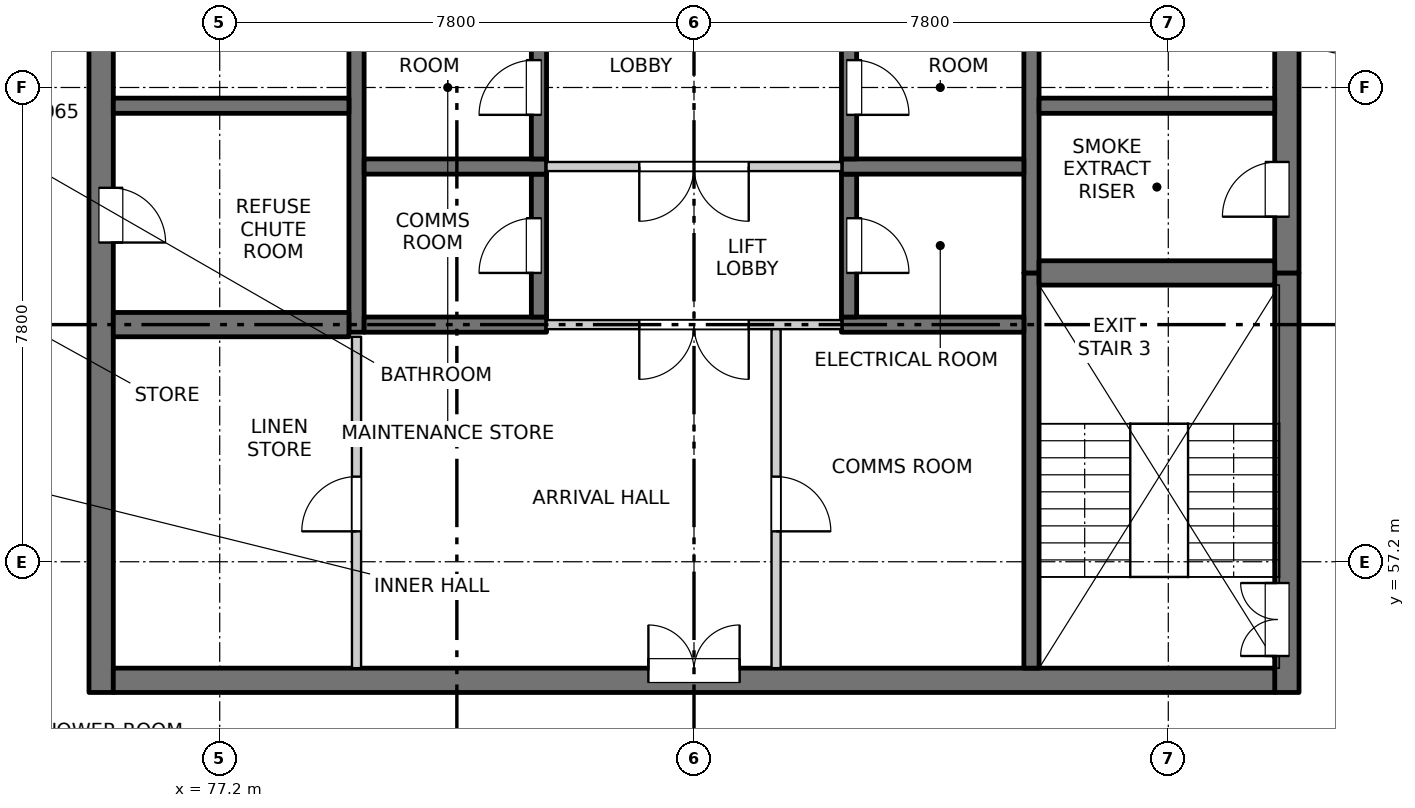
"""IFC4 building model, lengths in metres.
Left out: names, types, materials, properties, quantities, classifications, styles, units other than length and angle.
Written with IfcOpenShell. Run it as: python <this file> out.ifc"""

import sys

from ifc_helpers import new_model, si_unit, direction, frame, frame_2d, origin, place, context, subcontext, project, spatial, rectangle, extrude, element, fill, save


model = new_model("IFC4")
c1 = context("Model", 3, precision=1e-05, world=origin(), true_north=direction((0.0, 1.0)))
c2 = subcontext(c1, "Body", "Model", "MODEL_VIEW")
j1 = project(units=[si_unit("LENGTHUNIT", "METRE"), si_unit("PLANEANGLEUNIT", "RADIAN")], contexts=[c1])
p1 = place(None, origin())
s1 = spatial("IfcSite", under=j1, at=p1, CompositionType="ELEMENT")
p2 = place(p1, origin())
s2 = spatial("IfcBuilding", under=s1, at=p2, CompositionType="ELEMENT")
p3 = place(p2, frame((0.0, 0.0, 238.1)))
s3 = spatial("IfcBuildingStorey", under=s2, at=p3, CompositionType="ELEMENT", Elevation=238.1)
p4 = place(p3, frame((75.25, 55.05, -0.25), z_axis=(0.0, 0.0, 1.0), x_axis=(0.0, 1.0, 0.0)))
e1 = element("IfcWall", 1, at=p4, inside=s3, PredefinedType="SOLIDWALL", context=c2, shape_type="SweptSolid", body=[
    extrude(rectangle(XDim=22.25, YDim=0.4, at=frame_2d((11.125, 0.0))), origin(), (0.0, 0.0, 1.0), 3.35),
])
p5 = place(p4, frame((7.4, 0.0, 0.25)))
e2 = element("IfcOpeningElement", 2, at=p5, cuts=e1, PredefinedType="OPENING", context=c2, shape_type="SweptSolid", body=[
    extrude(rectangle(XDim=0.9, YDim=2.1, at=frame_2d((0.45, 1.05))), frame((0.0, 0.21, 0.0), z_axis=(0.0, -1.0, 0.0), x_axis=(1.0, 0.0, 0.0)), (0.0, 0.0, 1.0), 0.42),
])
p6 = place(p4, frame((12.05, 0.0, 0.25)))
e3 = element("IfcOpeningElement", 3, at=p6, cuts=e1, PredefinedType="OPENING", context=c2, shape_type="SweptSolid", body=[
    extrude(rectangle(XDim=0.9, YDim=2.1, at=frame_2d((0.45, 1.05))), frame((0.0, 0.21, 0.0), z_axis=(0.0, -1.0, 0.0), x_axis=(1.0, 0.0, 0.0)), (0.0, 0.0, 1.0), 0.42),
])
p7 = place(p4, frame((16.55, 0.0, 0.25)))
e4 = element("IfcOpeningElement", 4, at=p7, cuts=e1, PredefinedType="OPENING", context=c2, shape_type="SweptSolid", body=[
    extrude(rectangle(XDim=0.9, YDim=2.1, at=frame_2d((0.45, 1.05))), frame((0.0, 0.21, 0.0), z_axis=(0.0, -1.0, 0.0), x_axis=(1.0, 0.0, 0.0)), (0.0, 0.0, 1.0), 0.42),
])
p8 = place(p4, frame((20.0, 0.0, 0.25)))
e5 = element("IfcOpeningElement", 5, at=p8, cuts=e1, PredefinedType="OPENING", context=c2, shape_type="SweptSolid", body=[
    extrude(rectangle(XDim=0.9, YDim=2.1, at=frame_2d((0.45, 1.05))), frame((0.0, 0.21, 0.0), z_axis=(0.0, -1.0, 0.0), x_axis=(1.0, 0.0, 0.0)), (0.0, 0.0, 1.0), 0.42),
])
p9 = place(p3, frame((94.75, 55.05, -0.25), z_axis=(0.0, 0.0, 1.0), x_axis=(0.0, 1.0, 0.0)))
e6 = element("IfcWall", 6, at=p9, inside=s3, PredefinedType="SOLIDWALL", context=c2, shape_type="SweptSolid", body=[
    extrude(rectangle(XDim=6.9, YDim=0.4, at=frame_2d((3.45, 0.0))), origin(), (0.0, 0.0, 1.0), 3.35),
])
p10 = place(p9, frame((0.6, 0.0, 0.25)))
e7 = element("IfcOpeningElement", 7, at=p10, cuts=e6, PredefinedType="OPENING", context=c2, shape_type="SweptSolid", body=[
    extrude(rectangle(XDim=1.2, YDim=2.1, at=frame_2d((0.6, 1.05))), frame((0.0, 0.21, 0.0), z_axis=(0.0, -1.0, 0.0), x_axis=(1.0, 0.0, 0.0)), (0.0, 0.0, 1.0), 0.42),
])
p11 = place(p3, frame((94.75, 61.95, -0.25), z_axis=(0.0, 0.0, 1.0), x_axis=(0.0, 1.0, 0.0)))
e8 = element("IfcWall", 8, at=p11, inside=s3, PredefinedType="SOLIDWALL", context=c2, shape_type="SweptSolid", body=[
    extrude(rectangle(XDim=15.35, YDim=0.4, at=frame_2d((7.675, 0.0))), origin(), (0.0, 0.0, 1.0), 3.35),
])
p12 = place(p11, frame((0.925, 0.0, 0.25)))
e9 = element("IfcOpeningElement", 9, at=p12, cuts=e8, PredefinedType="OPENING", context=c2, shape_type="SweptSolid", body=[
    extrude(rectangle(XDim=0.9, YDim=2.1, at=frame_2d((0.45, 1.05))), frame((0.0, 0.21, 0.0), z_axis=(0.0, -1.0, 0.0), x_axis=(1.0, 0.0, 0.0)), (0.0, 0.0, 1.0), 0.42),
])
p13 = place(p11, frame((6.8, 0.0, 0.25)))
e10 = element("IfcOpeningElement", 10, at=p13, cuts=e8, PredefinedType="OPENING", context=c2, shape_type="SweptSolid", body=[
    extrude(rectangle(XDim=0.9, YDim=2.1, at=frame_2d((0.45, 1.05))), frame((0.0, 0.21, 0.0), z_axis=(0.0, -1.0, 0.0), x_axis=(1.0, 0.0, 0.0)), (0.0, 0.0, 1.0), 0.42),
])
p14 = place(p11, frame((13.1, 0.0, 0.25)))
e11 = element("IfcOpeningElement", 11, at=p14, cuts=e8, PredefinedType="OPENING", context=c2, shape_type="SweptSolid", body=[
    extrude(rectangle(XDim=0.9, YDim=2.1, at=frame_2d((0.45, 1.05))), frame((0.0, 0.21, 0.0), z_axis=(0.0, -1.0, 0.0), x_axis=(1.0, 0.0, 0.0)), (0.0, 0.0, 1.0), 0.42),
])
p15 = place(p3, frame((75.45, 55.25, -0.25), z_axis=(0.0, 0.0, 1.0), x_axis=(1.0, 0.0, 0.0)))
e12 = element("IfcWall", 12, at=p15, inside=s3, PredefinedType="SOLIDWALL", context=c2, shape_type="SweptSolid", body=[
    extrude(rectangle(XDim=19.1, YDim=0.4, at=frame_2d((9.55, 0.0))), origin(), (0.0, 0.0, 1.0), 3.35),
])
p16 = place(p15, frame((8.8, 0.0, 0.25)))
e13 = element("IfcOpeningElement", 13, at=p16, cuts=e12, PredefinedType="OPENING", context=c2, shape_type="SweptSolid", body=[
    extrude(rectangle(XDim=1.5, YDim=2.1, at=frame_2d((0.75, 1.05))), frame((0.0, 0.21, 0.0), z_axis=(0.0, -1.0, 0.0), x_axis=(1.0, 0.0, 0.0)), (0.0, 0.0, 1.0), 0.42),
])
p17 = place(p3, frame((79.45, 60.975, -0.25), z_axis=(0.0, 0.0, 1.0), x_axis=(0.0, 1.0, 0.0)))
e14 = element("IfcWall", 14, at=p17, inside=s3, PredefinedType="SOLIDWALL", context=c2, shape_type="SweptSolid", body=[
    extrude(rectangle(XDim=16.325, YDim=0.25, at=frame_2d((8.163, 0.0))), origin(), (0.0, 0.0, 1.0), 3.35),
])
p18 = place(p3, frame((90.55, 55.45, -0.25), z_axis=(0.0, 0.0, 1.0), x_axis=(0.0, 1.0, 0.0)))
e15 = element("IfcWall", 15, at=p18, inside=s3, PredefinedType="SOLIDWALL", context=c2, shape_type="SweptSolid", body=[
    extrude(rectangle(XDim=6.5, YDim=0.25, at=frame_2d((3.25, 0.0))), origin(), (0.0, 0.0, 1.0), 3.35),
])
p19 = place(p3, frame((90.55, 61.95, -0.25), z_axis=(0.0, 0.0, 1.0), x_axis=(0.0, 1.0, 0.0)))
e16 = element("IfcWall", 16, at=p19, inside=s3, PredefinedType="SOLIDWALL", context=c2, shape_type="SweptSolid", body=[
    extrude(rectangle(XDim=15.35, YDim=0.25, at=frame_2d((7.675, 0.0))), origin(), (0.0, 0.0, 1.0), 3.35),
])
p20 = place(p3, frame((79.575, 61.1, -0.25), z_axis=(0.0, 0.0, 1.0), x_axis=(1.0, 0.0, 0.0)))
e17 = element("IfcWall", 17, at=p20, inside=s3, PredefinedType="SOLIDWALL", context=c2, shape_type="SweptSolid", body=[
    extrude(rectangle(XDim=3.0, YDim=0.25, at=frame_2d((1.5, 0.0))), origin(), (0.0, 0.0, 1.0), 3.35),
])
p21 = place(p3, frame((82.45, 61.225, -0.25), z_axis=(0.0, 0.0, 1.0), x_axis=(0.0, 1.0, 0.0)))
e18 = element("IfcWall", 18, at=p21, inside=s3, PredefinedType="SOLIDWALL", context=c2, shape_type="SweptSolid", body=[
    extrude(rectangle(XDim=2.35, YDim=0.25, at=frame_2d((1.175, 0.0))), origin(), (0.0, 0.0, 1.0), 3.35),
])
p22 = place(p21, frame((0.725, 0.0, 0.25)))
e19 = element("IfcOpeningElement", 19, at=p22, cuts=e18, PredefinedType="OPENING", context=c2, shape_type="SweptSolid", body=[
    extrude(rectangle(XDim=0.9, YDim=2.1, at=frame_2d((0.45, 1.05))), frame((0.0, 0.135, 0.0), z_axis=(0.0, -1.0, 0.0), x_axis=(1.0, 0.0, 0.0)), (0.0, 0.0, 1.0), 0.27),
])
p23 = place(p3, frame((79.575, 63.7, -0.25), z_axis=(0.0, 0.0, 1.0), x_axis=(1.0, 0.0, 0.0)))
e20 = element("IfcWall", 20, at=p23, inside=s3, PredefinedType="SOLIDWALL", context=c2, shape_type="SweptSolid", body=[
    extrude(rectangle(XDim=3.0, YDim=0.25, at=frame_2d((1.5, 0.0))), origin(), (0.0, 0.0, 1.0), 3.35),
])
p24 = place(p3, frame((82.45, 63.825, -0.25), z_axis=(0.0, 0.0, 1.0), x_axis=(0.0, 1.0, 0.0)))
e21 = element("IfcWall", 21, at=p24, inside=s3, PredefinedType="SOLIDWALL", context=c2, shape_type="SweptSolid", body=[
    extrude(rectangle(XDim=2.35, YDim=0.25, at=frame_2d((1.175, 0.0))), origin(), (0.0, 0.0, 1.0), 3.35),
])
p25 = place(p24, frame((0.725, 0.0, 0.25)))
e22 = element("IfcOpeningElement", 22, at=p25, cuts=e21, PredefinedType="OPENING", context=c2, shape_type="SweptSolid", body=[
    extrude(rectangle(XDim=0.9, YDim=2.1, at=frame_2d((0.45, 1.05))), frame((0.0, 0.135, 0.0), z_axis=(0.0, -1.0, 0.0), x_axis=(1.0, 0.0, 0.0)), (0.0, 0.0, 1.0), 0.27),
])
p26 = place(p3, frame((87.425, 61.1, -0.25), z_axis=(0.0, 0.0, 1.0), x_axis=(1.0, 0.0, 0.0)))
e23 = element("IfcWall", 23, at=p26, inside=s3, PredefinedType="SOLIDWALL", context=c2, shape_type="SweptSolid", body=[
    extrude(rectangle(XDim=3.0, YDim=0.25, at=frame_2d((1.5, 0.0))), origin(), (0.0, 0.0, 1.0), 3.35),
])
p27 = place(p3, frame((87.55, 61.225, -0.25), z_axis=(0.0, 0.0, 1.0), x_axis=(0.0, 1.0, 0.0)))
e24 = element("IfcWall", 24, at=p27, inside=s3, PredefinedType="SOLIDWALL", context=c2, shape_type="SweptSolid", body=[
    extrude(rectangle(XDim=2.35, YDim=0.25, at=frame_2d((1.175, 0.0))), origin(), (0.0, 0.0, 1.0), 3.35),
])
p28 = place(p27, frame((0.725, 0.0, 0.25)))
e25 = element("IfcOpeningElement", 25, at=p28, cuts=e24, PredefinedType="OPENING", context=c2, shape_type="SweptSolid", body=[
    extrude(rectangle(XDim=0.9, YDim=2.1, at=frame_2d((0.45, 1.05))), frame((0.0, 0.135, 0.0), z_axis=(0.0, -1.0, 0.0), x_axis=(1.0, 0.0, 0.0)), (0.0, 0.0, 1.0), 0.27),
])
p29 = place(p3, frame((87.425, 63.7, -0.25), z_axis=(0.0, 0.0, 1.0), x_axis=(1.0, 0.0, 0.0)))
e26 = element("IfcWall", 26, at=p29, inside=s3, PredefinedType="SOLIDWALL", context=c2, shape_type="SweptSolid", body=[
    extrude(rectangle(XDim=3.0, YDim=0.25, at=frame_2d((1.5, 0.0))), origin(), (0.0, 0.0, 1.0), 3.35),
])
p30 = place(p3, frame((87.55, 63.825, -0.25), z_axis=(0.0, 0.0, 1.0), x_axis=(0.0, 1.0, 0.0)))
e27 = element("IfcWall", 27, at=p30, inside=s3, PredefinedType="SOLIDWALL", context=c2, shape_type="SweptSolid", body=[
    extrude(rectangle(XDim=2.35, YDim=0.25, at=frame_2d((1.175, 0.0))), origin(), (0.0, 0.0, 1.0), 3.35),
])
p31 = place(p30, frame((0.725, 0.0, 0.25)))
e28 = element("IfcOpeningElement", 28, at=p31, cuts=e27, PredefinedType="OPENING", context=c2, shape_type="SweptSolid", body=[
    extrude(rectangle(XDim=0.9, YDim=2.1, at=frame_2d((0.45, 1.05))), frame((0.0, 0.135, 0.0), z_axis=(0.0, -1.0, 0.0), x_axis=(1.0, 0.0, 0.0)), (0.0, 0.0, 1.0), 0.27),
])
p32 = place(p3, frame((75.45, 61.1, -0.25), z_axis=(0.0, 0.0, 1.0), x_axis=(1.0, 0.0, 0.0)))
e29 = element("IfcWall", 29, at=p32, inside=s3, PredefinedType="SOLIDWALL", context=c2, shape_type="SweptSolid", body=[
    extrude(rectangle(XDim=3.875, YDim=0.4, at=frame_2d((1.938, 0.0))), origin(), (0.0, 0.0, 1.0), 3.35),
])
p33 = place(p3, frame((75.45, 64.7, -0.25), z_axis=(0.0, 0.0, 1.0), x_axis=(1.0, 0.0, 0.0)))
e30 = element("IfcWall", 30, at=p33, inside=s3, PredefinedType="SOLIDWALL", context=c2, shape_type="SweptSolid", body=[
    extrude(rectangle(XDim=3.875, YDim=0.25, at=frame_2d((1.938, 0.0))), origin(), (0.0, 0.0, 1.0), 3.35),
])
p34 = place(p3, frame((90.675, 61.95, -0.25), z_axis=(0.0, 0.0, 1.0), x_axis=(1.0, 0.0, 0.0)))
e31 = element("IfcWall", 31, at=p34, inside=s3, PredefinedType="SOLIDWALL", context=c2, shape_type="SweptSolid", body=[
    extrude(rectangle(XDim=3.875, YDim=0.4, at=frame_2d((1.938, 0.0))), origin(), (0.0, 0.0, 1.0), 3.35),
])
p35 = place(p3, frame((90.675, 64.7, -0.25), z_axis=(0.0, 0.0, 1.0), x_axis=(1.0, 0.0, 0.0)))
e32 = element("IfcWall", 32, at=p35, inside=s3, PredefinedType="SOLIDWALL", context=c2, shape_type="SweptSolid", body=[
    extrude(rectangle(XDim=3.875, YDim=0.25, at=frame_2d((1.938, 0.0))), origin(), (0.0, 0.0, 1.0), 3.35),
])
p36 = place(p3, frame((82.575, 61.1, 0.0), z_axis=(0.0, 0.0, 1.0), x_axis=(1.0, 0.0, 0.0)))
e33 = element("IfcWall", 33, at=p36, inside=s3, PredefinedType="PARTITIONING", context=c2, shape_type="SweptSolid", body=[
    extrude(rectangle(XDim=4.85, YDim=0.15, at=frame_2d((2.425, 0.0))), origin(), (0.0, 0.0, 1.0), 3.1),
])
p37 = place(p36, frame((1.525, 0.0, 0.0)))
e34 = element("IfcOpeningElement", 34, at=p37, cuts=e33, PredefinedType="OPENING", context=c2, shape_type="SweptSolid", body=[
    extrude(rectangle(XDim=1.8, YDim=2.1, at=frame_2d((0.9, 1.05))), frame((0.0, 0.085, 0.0), z_axis=(0.0, -1.0, 0.0), x_axis=(1.0, 0.0, 0.0)), (0.0, 0.0, 1.0), 0.17),
])
p38 = place(p3, frame((82.575, 63.7, 0.0), z_axis=(0.0, 0.0, 1.0), x_axis=(1.0, 0.0, 0.0)))
e35 = element("IfcWall", 35, at=p38, inside=s3, PredefinedType="PARTITIONING", context=c2, shape_type="SweptSolid", body=[
    extrude(rectangle(XDim=4.85, YDim=0.15, at=frame_2d((2.425, 0.0))), origin(), (0.0, 0.0, 1.0), 3.1),
])
p39 = place(p38, frame((1.525, 0.0, 0.0)))
e36 = element("IfcOpeningElement", 36, at=p39, cuts=e35, PredefinedType="OPENING", context=c2, shape_type="SweptSolid", body=[
    extrude(rectangle(XDim=1.8, YDim=2.1, at=frame_2d((0.9, 1.05))), frame((0.0, 0.085, 0.0), z_axis=(0.0, -1.0, 0.0), x_axis=(1.0, 0.0, 0.0)), (0.0, 0.0, 1.0), 0.17),
])
p40 = place(p3, frame((79.45, 55.45, 0.0), z_axis=(0.0, 0.0, 1.0), x_axis=(0.0, 1.0, 0.0)))
e37 = element("IfcWall", 37, at=p40, inside=s3, PredefinedType="PARTITIONING", context=c2, shape_type="SweptSolid", body=[
    extrude(rectangle(XDim=5.45, YDim=0.15, at=frame_2d((2.725, 0.0))), origin(), (0.0, 0.0, 1.0), 3.1),
])
p41 = place(p40, frame((2.25, 0.0, 0.0)))
e38 = element("IfcOpeningElement", 38, at=p41, cuts=e37, PredefinedType="OPENING", context=c2, shape_type="SweptSolid", body=[
    extrude(rectangle(XDim=0.9, YDim=2.1, at=frame_2d((0.45, 1.05))), frame((0.0, 0.085, 0.0), z_axis=(0.0, -1.0, 0.0), x_axis=(1.0, 0.0, 0.0)), (0.0, 0.0, 1.0), 0.17),
])
p42 = place(p3, frame((86.35, 55.45, 0.0), z_axis=(0.0, 0.0, 1.0), x_axis=(0.0, 1.0, 0.0)))
e39 = element("IfcWall", 39, at=p42, inside=s3, PredefinedType="PARTITIONING", context=c2, shape_type="SweptSolid", body=[
    extrude(rectangle(XDim=5.575, YDim=0.15, at=frame_2d((2.788, 0.0))), origin(), (0.0, 0.0, 1.0), 3.1),
])
p43 = place(p42, frame((2.25, 0.0, 0.0)))
e40 = element("IfcOpeningElement", 40, at=p43, cuts=e39, PredefinedType="OPENING", context=c2, shape_type="SweptSolid", body=[
    extrude(rectangle(XDim=0.9, YDim=2.1, at=frame_2d((0.45, 1.05))), frame((0.0, 0.085, 0.0), z_axis=(0.0, -1.0, 0.0), x_axis=(1.0, 0.0, 0.0)), (0.0, 0.0, 1.0), 0.17),
])
p44 = place(p16, origin())
e41 = element("IfcDoor", 41, at=p44, inside=s3, OperationType="DOUBLE_DOOR_SINGLE_SWING", PredefinedType="DOOR", context=c2, shape_type="SweptSolid", body=[
    extrude(rectangle(XDim=1.5, YDim=2.1, at=frame_2d((0.75, 1.05))), frame((0.0, 0.185, 0.0), z_axis=(0.0, -1.0, 0.0), x_axis=(1.0, 0.0, 0.0)), (0.0, 0.0, 1.0), 0.05),
])
fill(e13, e41)
p45 = place(p10, origin())
e42 = element("IfcDoor", 42, at=p45, inside=s3, OperationType="DOUBLE_DOOR_SINGLE_SWING", PredefinedType="DOOR", context=c2, shape_type="SweptSolid", body=[
    extrude(rectangle(XDim=1.2, YDim=2.1, at=frame_2d((0.6, 1.05))), frame((0.0, 0.185, 0.0), z_axis=(0.0, -1.0, 0.0), x_axis=(1.0, 0.0, 0.0)), (0.0, 0.0, 1.0), 0.05),
])
fill(e7, e42)
p46 = place(p41, origin())
e43 = element("IfcDoor", 43, at=p46, inside=s3, OperationType="SINGLE_SWING_LEFT", PredefinedType="DOOR", context=c2, shape_type="SweptSolid", body=[
    extrude(rectangle(XDim=0.9, YDim=2.1, at=frame_2d((0.45, 1.05))), frame((0.0, 0.025, 0.0), z_axis=(0.0, -1.0, 0.0), x_axis=(1.0, 0.0, 0.0)), (0.0, 0.0, 1.0), 0.05),
])
fill(e38, e43)
p47 = place(p43, origin())
e44 = element("IfcDoor", 44, at=p47, inside=s3, OperationType="SINGLE_SWING_RIGHT", PredefinedType="DOOR", context=c2, shape_type="SweptSolid", body=[
    extrude(rectangle(XDim=0.9, YDim=2.1, at=frame_2d((0.45, 1.05))), frame((0.0, 0.025, 0.0), z_axis=(0.0, -1.0, 0.0), x_axis=(1.0, 0.0, 0.0)), (0.0, 0.0, 1.0), 0.05),
])
fill(e40, e44)
p48 = place(p37, origin())
e45 = element("IfcDoor", 45, at=p48, inside=s3, OperationType="DOUBLE_DOOR_SINGLE_SWING", PredefinedType="DOOR", context=c2, shape_type="SweptSolid", body=[
    extrude(rectangle(XDim=1.8, YDim=2.1, at=frame_2d((0.9, 1.05))), frame((0.0, 0.025, 0.0), z_axis=(0.0, -1.0, 0.0), x_axis=(1.0, 0.0, 0.0)), (0.0, 0.0, 1.0), 0.05),
])
fill(e34, e45)
p49 = place(p22, origin())
e46 = element("IfcDoor", 46, at=p49, inside=s3, OperationType="SINGLE_SWING_LEFT", PredefinedType="DOOR", context=c2, shape_type="SweptSolid", body=[
    extrude(rectangle(XDim=0.9, YDim=2.1, at=frame_2d((0.45, 1.05))), frame((0.0, 0.11, 0.0), z_axis=(0.0, -1.0, 0.0), x_axis=(1.0, 0.0, 0.0)), (0.0, 0.0, 1.0), 0.05),
])
fill(e19, e46)
p50 = place(p28, origin())
e47 = element("IfcDoor", 47, at=p50, inside=s3, OperationType="SINGLE_SWING_RIGHT", PredefinedType="DOOR", context=c2, shape_type="SweptSolid", body=[
    extrude(rectangle(XDim=0.9, YDim=2.1, at=frame_2d((0.45, 1.05))), frame((0.0, -0.06, 0.0), z_axis=(0.0, -1.0, 0.0), x_axis=(1.0, 0.0, 0.0)), (0.0, 0.0, 1.0), 0.05),
])
fill(e25, e47)
p51 = place(p5, origin())
e48 = element("IfcDoor", 48, at=p51, inside=s3, OperationType="SINGLE_SWING_RIGHT", PredefinedType="DOOR", context=c2, shape_type="SweptSolid", body=[
    extrude(rectangle(XDim=0.9, YDim=2.1, at=frame_2d((0.45, 1.05))), frame((0.0, -0.135, 0.0), z_axis=(0.0, -1.0, 0.0), x_axis=(1.0, 0.0, 0.0)), (0.0, 0.0, 1.0), 0.05),
])
fill(e2, e48)
p52 = place(p12, origin())
e49 = element("IfcDoor", 49, at=p52, inside=s3, OperationType="SINGLE_SWING_LEFT", PredefinedType="DOOR", context=c2, shape_type="SweptSolid", body=[
    extrude(rectangle(XDim=0.9, YDim=2.1, at=frame_2d((0.45, 1.05))), frame((0.0, 0.185, 0.0), z_axis=(0.0, -1.0, 0.0), x_axis=(1.0, 0.0, 0.0)), (0.0, 0.0, 1.0), 0.05),
])
fill(e9, e49)
p53 = place(p39, origin())
e50 = element("IfcDoor", 50, at=p53, inside=s3, OperationType="DOUBLE_DOOR_SINGLE_SWING", PredefinedType="DOOR", context=c2, shape_type="SweptSolid", body=[
    extrude(rectangle(XDim=1.8, YDim=2.1, at=frame_2d((0.9, 1.05))), frame((0.0, 0.025, 0.0), z_axis=(0.0, -1.0, 0.0), x_axis=(1.0, 0.0, 0.0)), (0.0, 0.0, 1.0), 0.05),
])
fill(e36, e50)
p54 = place(p25, origin())
e51 = element("IfcDoor", 51, at=p54, inside=s3, OperationType="SINGLE_SWING_LEFT", PredefinedType="DOOR", context=c2, shape_type="SweptSolid", body=[
    extrude(rectangle(XDim=0.9, YDim=2.1, at=frame_2d((0.45, 1.05))), frame((0.0, 0.11, 0.0), z_axis=(0.0, -1.0, 0.0), x_axis=(1.0, 0.0, 0.0)), (0.0, 0.0, 1.0), 0.05),
])
fill(e22, e51)
p55 = place(p31, origin())
e52 = element("IfcDoor", 52, at=p55, inside=s3, OperationType="SINGLE_SWING_RIGHT", PredefinedType="DOOR", context=c2, shape_type="SweptSolid", body=[
    extrude(rectangle(XDim=0.9, YDim=2.1, at=frame_2d((0.45, 1.05))), frame((0.0, -0.06, 0.0), z_axis=(0.0, -1.0, 0.0), x_axis=(1.0, 0.0, 0.0)), (0.0, 0.0, 1.0), 0.05),
])
fill(e28, e52)
save(model, sys.argv[1])
